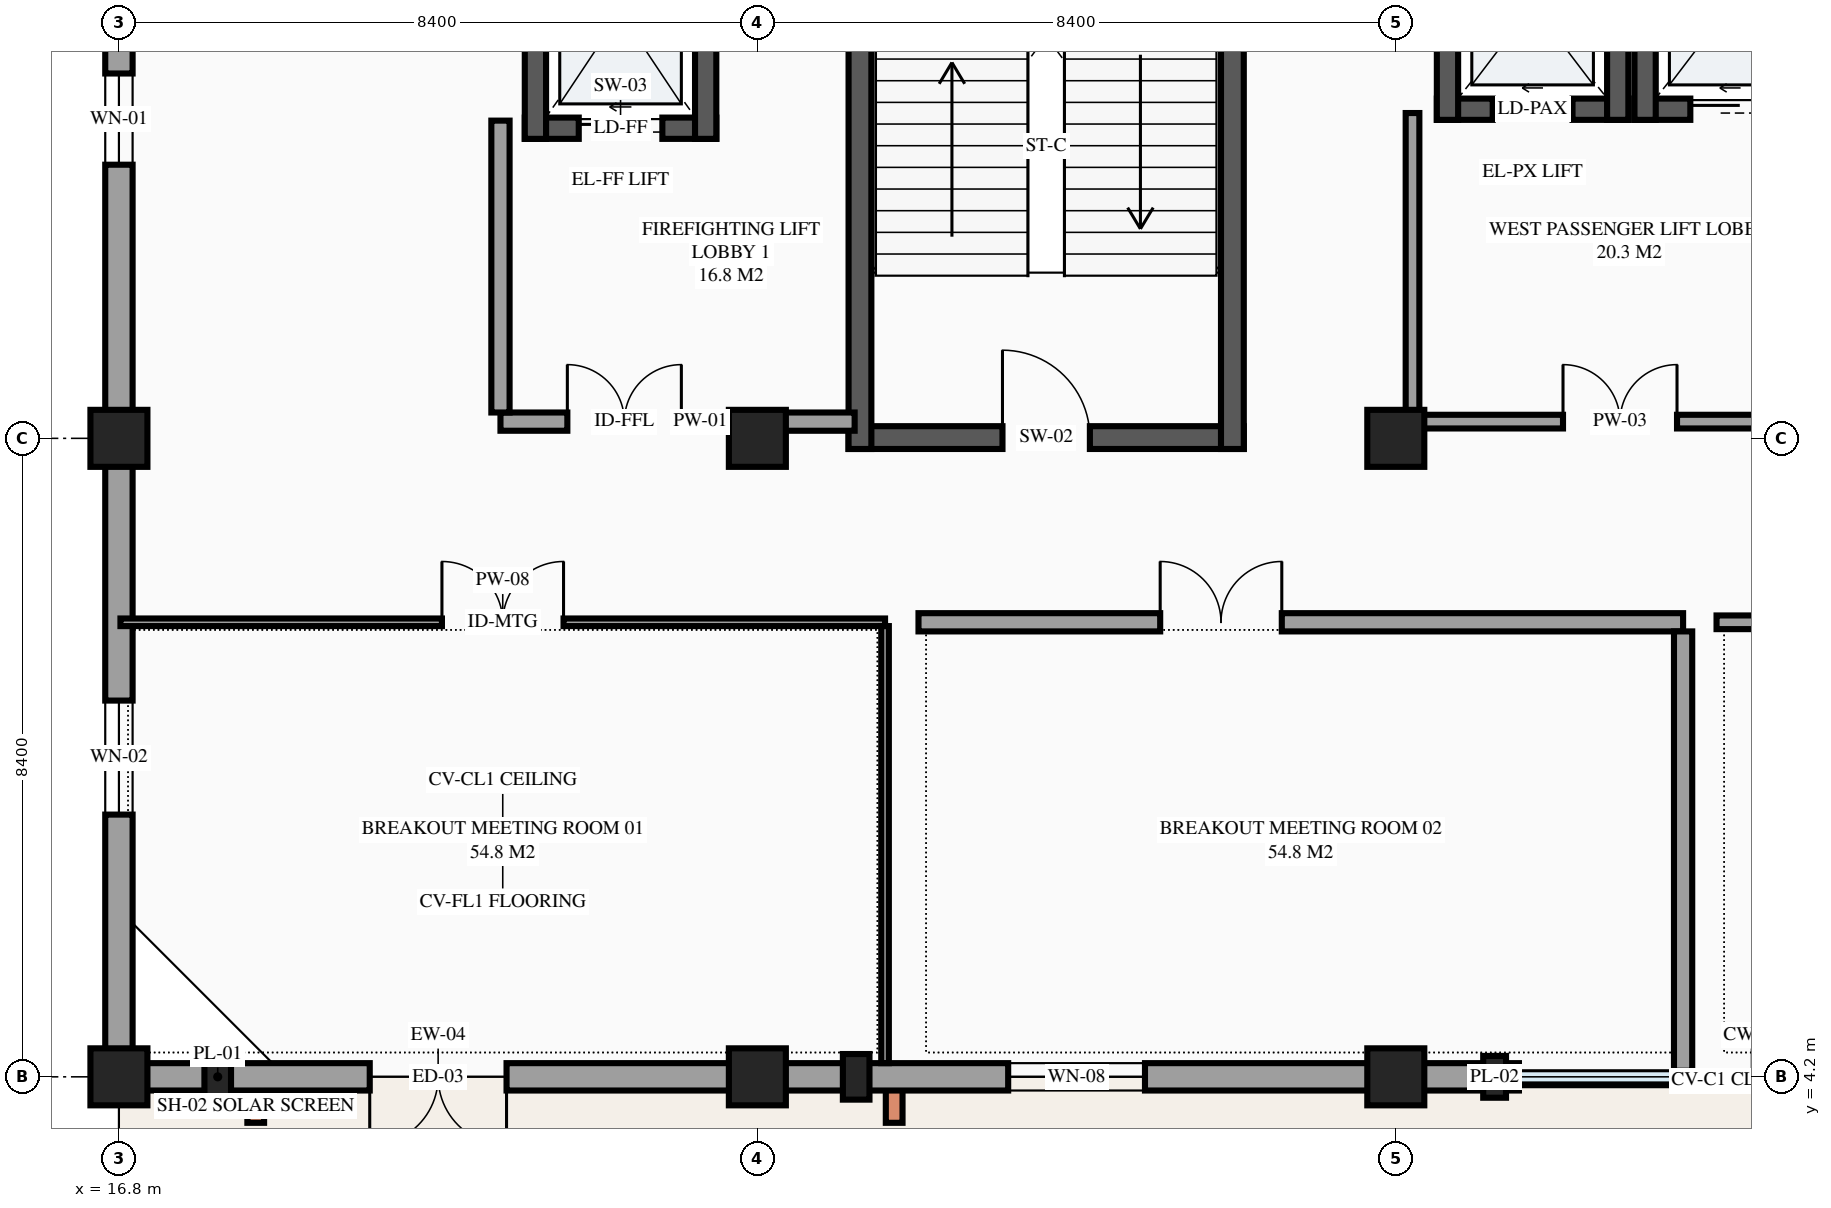
"""IFC4 building model, lengths in metres.
Left out: names, types, materials, properties, quantities, classifications, styles, units other than length and angle.
Written with IfcOpenShell. Run it as: python <this file> out.ifc"""

import sys

from ifc_helpers import new_model, si_unit, direction, frame, frame_2d, origin, origin_2d, place, context, subcontext, project, spatial, rectangle, extrude, element, fill, save


model = new_model("IFC4")
c1 = context("Model", 3, precision=1e-05, world=origin(), true_north=direction((0.0, 1.0)))
c2 = subcontext(c1, "Body", "Model", "MODEL_VIEW")
j1 = project(units=[si_unit("LENGTHUNIT", "METRE"), si_unit("PLANEANGLEUNIT", "RADIAN")], contexts=[c1])
p1 = place(None, origin())
s1 = spatial("IfcSite", under=j1, at=p1, CompositionType="ELEMENT")
p2 = place(p1, origin())
s2 = spatial("IfcBuilding", under=s1, at=p2, CompositionType="ELEMENT")
p3 = place(p2, frame((0.0, 0.0, 5.4)))
s3 = spatial("IfcBuildingStorey", under=s2, at=p3, CompositionType="ELEMENT", Elevation=5.4)
for number, where, z_axis, x_axis in (
    (1, (16.8, 4.2, 0.0), (0.0, 0.0, 1.0), (1.0, 0.0, 0.0)),
    (2, (16.8, 12.6, 0.0), (0.0, 0.0, 1.0), (1.0, 0.0, 0.0)),
    (3, (25.2, 4.2, 0.0), (0.0, 0.0, 1.0), (1.0, 0.0, 0.0)),
    (4, (25.2, 12.6, 0.0), (0.0, 0.0, 1.0), (1.0, 0.0, 0.0)),
    (5, (33.6, 4.2, 0.0), (0.0, 0.0, 1.0), (1.0, 0.0, 0.0)),
    (6, (33.6, 12.6, 0.0), (0.0, 0.0, 1.0), (1.0, 0.0, 0.0)),
):
    element("IfcColumn", number, at=place(p3, frame(where, z_axis=z_axis, x_axis=x_axis)), inside=s3, PredefinedType="COLUMN", context=c2, shape_type="SweptSolid", body=[
        extrude(rectangle(XDim=0.75, YDim=0.75, at=origin_2d()), origin(), (0.0, 0.0, 1.0), 4.5),
    ])
for number, where, z_axis, x_axis in (
    (7, (18.1, 4.2, 0.0), (0.0, 0.0, 1.0), (1.0, 0.0, 0.0)),
    (8, (26.5, 4.2, 0.0), (0.0, 0.0, 1.0), (1.0, 0.0, 0.0)),
):
    element("IfcColumn", number, at=place(p3, frame(where, z_axis=z_axis, x_axis=x_axis)), inside=s3, PredefinedType="PILASTER", context=c2, shape_type="SweptSolid", body=[
        extrude(rectangle(XDim=0.35, YDim=0.6, at=origin_2d()), origin(), (0.0, 0.0, 1.0), 4.5),
    ])
p4 = place(p3, frame((34.9, 4.2, 0.0), z_axis=(0.0, 0.0, 1.0), x_axis=(1.0, 0.0, 0.0)))
e9 = element("IfcColumn", 9, at=p4, inside=s3, PredefinedType="PILASTER", context=c2, shape_type="SweptSolid", body=[
    extrude(rectangle(XDim=0.3, YDim=0.55, at=origin_2d()), origin(), (0.0, 0.0, 1.0), 4.5),
])
p5 = place(p3, frame((16.8, 4.2, 0.0), z_axis=(0.0, 0.0, 1.0), x_axis=(1.0, 0.0, 0.0)))
e10 = element("IfcWall", 10, at=p5, inside=s3, PredefinedType="STANDARD", context=c2, shape_type="SweptSolid", body=[
    extrude(rectangle(XDim=8.4, YDim=0.36, at=frame_2d((4.2, 0.0))), origin(), (0.0, 0.0, 1.0), 4.5),
])
p6 = place(p5, frame((5.1, 0.0, 0.0), z_axis=(0.0, 0.0, 1.0), x_axis=(-1.0, 0.0, 0.0)))
e11 = element("IfcOpeningElement", 11, at=p6, cuts=e10, PredefinedType="OPENING", context=c2, shape_type="SweptSolid", body=[
    extrude(rectangle(XDim=1.8, YDim=2.3, at=frame_2d((0.9, 1.15))), frame((0.0, 0.19, 0.0), z_axis=(0.0, -1.0, 0.0), x_axis=(1.0, 0.0, 0.0)), (0.0, 0.0, 1.0), 0.38),
])
p7 = place(p3, frame((25.2, 4.2, 0.0), z_axis=(0.0, 0.0, 1.0), x_axis=(1.0, 0.0, 0.0)))
e12 = element("IfcWall", 12, at=p7, inside=s3, PredefinedType="STANDARD", context=c2, shape_type="SweptSolid", body=[
    extrude(rectangle(XDim=8.4, YDim=0.36, at=frame_2d((4.2, 0.0))), origin(), (0.0, 0.0, 1.0), 3.39),
])
p8 = place(p7, frame((3.3, 0.0, 0.75)))
e13 = element("IfcOpeningElement", 13, at=p8, cuts=e12, PredefinedType="OPENING", context=c2, shape_type="SweptSolid", body=[
    extrude(rectangle(XDim=1.8, YDim=1.5, at=frame_2d((0.9, 0.75))), frame((0.0, 0.19, 0.0), z_axis=(0.0, -1.0, 0.0), x_axis=(1.0, 0.0, 0.0)), (0.0, 0.0, 1.0), 0.38),
])
p9 = place(p3, frame((33.6, 4.2, 0.0), z_axis=(0.0, 0.0, 1.0), x_axis=(1.0, 0.0, 0.0)))
e14 = element("IfcWall", 14, at=p9, inside=s3, PredefinedType="STANDARD", context=c2, shape_type="SweptSolid", body=[
    extrude(rectangle(XDim=1.62, YDim=0.36, at=frame_2d((0.81, 0.0))), origin(), (0.0, 0.0, 1.0), 3.74),
])
p10 = place(p3, frame((16.8, 21.0, 0.0), z_axis=(0.0, 0.0, 1.0), x_axis=(0.0, -1.0, 0.0)))
e15 = element("IfcWall", 15, at=p10, inside=s3, PredefinedType="STANDARD", context=c2, shape_type="SweptSolid", body=[
    extrude(rectangle(XDim=8.4, YDim=0.36, at=frame_2d((4.2, 0.0))), origin(), (0.0, 0.0, 1.0), 3.54),
])
p11 = place(p10, frame((3.6, 0.0, 0.8)))
e16 = element("IfcOpeningElement", 16, at=p11, cuts=e15, PredefinedType="OPENING", context=c2, shape_type="SweptSolid", body=[
    extrude(rectangle(XDim=1.2, YDim=1.5, at=frame_2d((0.6, 0.75))), frame((0.0, 0.19, 0.0), z_axis=(0.0, -1.0, 0.0), x_axis=(1.0, 0.0, 0.0)), (0.0, 0.0, 1.0), 0.38),
])
p12 = place(p3, frame((16.8, 12.6, 0.0), z_axis=(0.0, 0.0, 1.0), x_axis=(0.0, -1.0, 0.0)))
e17 = element("IfcWall", 17, at=p12, inside=s3, PredefinedType="STANDARD", context=c2, shape_type="SweptSolid", body=[
    extrude(rectangle(XDim=8.4, YDim=0.36, at=frame_2d((4.2, 0.0))), origin(), (0.0, 0.0, 1.0), 3.59),
])
p13 = place(p12, frame((3.45, 0.0, 0.8)))
e18 = element("IfcOpeningElement", 18, at=p13, cuts=e17, PredefinedType="OPENING", context=c2, shape_type="SweptSolid", body=[
    extrude(rectangle(XDim=1.5, YDim=1.5, at=frame_2d((0.75, 0.75))), frame((0.0, 0.19, 0.0), z_axis=(0.0, -1.0, 0.0), x_axis=(1.0, 0.0, 0.0)), (0.0, 0.0, 1.0), 0.38),
])
p14 = place(p3, frame((22.14, 16.68, 0.0), z_axis=(0.0, 0.0, 1.0), x_axis=(1.0, 0.0, 0.0)))
e19 = element("IfcWall", 19, at=p14, inside=s3, PredefinedType="SHEAR", context=c2, shape_type="SweptSolid", body=[
    extrude(rectangle(XDim=2.52, YDim=0.28, at=frame_2d((1.26, 0.0))), origin(), (0.0, 0.0, 1.0), 4.5),
])
p15 = place(p14, frame((0.71, 0.0, 0.0)))
e20 = element("IfcOpeningElement", 20, at=p15, cuts=e19, PredefinedType="OPENING", context=c2, shape_type="SweptSolid", body=[
    extrude(rectangle(XDim=1.1, YDim=2.2, at=frame_2d((0.55, 1.1))), frame((0.0, 0.15, 0.0), z_axis=(0.0, -1.0, 0.0), x_axis=(1.0, 0.0, 0.0)), (0.0, 0.0, 1.0), 0.3),
])
for number, where, z_axis, x_axis in (
    (21, (24.52, 16.54, 0.0), (0.0, 0.0, 1.0), (0.0, 1.0, 0.0)),
    (22, (22.28, 19.86, 0.0), (0.0, 0.0, 1.0), (0.0, -1.0, 0.0)),
):
    element("IfcWall", number, at=place(p3, frame(where, z_axis=z_axis, x_axis=x_axis)), inside=s3, PredefinedType="SHEAR", context=c2, shape_type="SweptSolid", body=[
        extrude(rectangle(XDim=3.32, YDim=0.28, at=frame_2d((1.66, 0.0))), origin(), (0.0, 0.0, 1.0), 4.5),
    ])
p16 = place(p3, frame((34.14, 16.93, 0.0), z_axis=(0.0, 0.0, 1.0), x_axis=(1.0, 0.0, 0.0)))
e23 = element("IfcWall", 23, at=p16, inside=s3, PredefinedType="SHEAR", context=c2, shape_type="SweptSolid", body=[
    extrude(rectangle(XDim=2.52, YDim=0.28, at=frame_2d((1.26, 0.0))), origin(), (0.0, 0.0, 1.0), 4.5),
])
p17 = place(p16, frame((0.735, 0.0, 0.0)))
e24 = element("IfcOpeningElement", 24, at=p17, cuts=e23, PredefinedType="OPENING", context=c2, shape_type="SweptSolid", body=[
    extrude(rectangle(XDim=1.05, YDim=2.2, at=frame_2d((0.525, 1.1))), frame((0.0, 0.15, 0.0), z_axis=(0.0, -1.0, 0.0), x_axis=(1.0, 0.0, 0.0)), (0.0, 0.0, 1.0), 0.3),
])
for number, where, z_axis, x_axis in (
    (25, (36.52, 16.79, 0.0), (0.0, 0.0, 1.0), (0.0, 1.0, 0.0)),
    (26, (34.28, 19.81, 0.0), (0.0, 0.0, 1.0), (0.0, -1.0, 0.0)),
):
    element("IfcWall", number, at=place(p3, frame(where, z_axis=z_axis, x_axis=x_axis)), inside=s3, PredefinedType="SHEAR", context=c2, shape_type="SweptSolid", body=[
        extrude(rectangle(XDim=3.02, YDim=0.28, at=frame_2d((1.51, 0.0))), origin(), (0.0, 0.0, 1.0), 4.5),
    ])
p18 = place(p3, frame((36.74, 16.93, 0.0), z_axis=(0.0, 0.0, 1.0), x_axis=(1.0, 0.0, 0.0)))
e27 = element("IfcWall", 27, at=p18, inside=s3, PredefinedType="SHEAR", context=c2, shape_type="SweptSolid", body=[
    extrude(rectangle(XDim=2.52, YDim=0.28, at=frame_2d((1.26, 0.0))), origin(), (0.0, 0.0, 1.0), 4.5),
])
p19 = place(p18, frame((0.735, 0.0, 0.0)))
e28 = element("IfcOpeningElement", 28, at=p19, cuts=e27, PredefinedType="OPENING", context=c2, shape_type="SweptSolid", body=[
    extrude(rectangle(XDim=1.05, YDim=2.2, at=frame_2d((0.525, 1.1))), frame((0.0, 0.15, 0.0), z_axis=(0.0, -1.0, 0.0), x_axis=(1.0, 0.0, 0.0)), (0.0, 0.0, 1.0), 0.3),
])
p20 = place(p3, frame((36.88, 19.81, 0.0), z_axis=(0.0, 0.0, 1.0), x_axis=(0.0, -1.0, 0.0)))
e29 = element("IfcWall", 29, at=p20, inside=s3, PredefinedType="SHEAR", context=c2, shape_type="SweptSolid", body=[
    extrude(rectangle(XDim=3.02, YDim=0.28, at=frame_2d((1.51, 0.0))), origin(), (0.0, 0.0, 1.0), 4.5),
])
p21 = place(p3, frame((26.4, 12.61, 0.0), z_axis=(0.0, 0.0, 1.0), x_axis=(1.0, 0.0, 0.0)))
e30 = element("IfcWall", 30, at=p21, inside=s3, PredefinedType="SHEAR", context=c2, shape_type="SweptSolid", body=[
    extrude(rectangle(XDim=5.2, YDim=0.3, at=frame_2d((2.6, 0.0))), origin(), (0.0, 0.0, 1.0), 4.5),
])
p22 = place(p21, frame((2.025, 0.0, 0.0)))
e31 = element("IfcOpeningElement", 31, at=p22, cuts=e30, PredefinedType="OPENING", context=c2, shape_type="SweptSolid", body=[
    extrude(rectangle(XDim=1.15, YDim=2.15, at=frame_2d((0.575, 1.075))), frame((0.0, 0.16, 0.0), z_axis=(0.0, -1.0, 0.0), x_axis=(1.0, 0.0, 0.0)), (0.0, 0.0, 1.0), 0.32),
])
for number, where, z_axis, x_axis in (
    (32, (31.45, 12.46, 0.0), (0.0, 0.0, 1.0), (0.0, 1.0, 0.0)),
    (33, (26.55, 21.3, 0.0), (0.0, 0.0, 1.0), (0.0, -1.0, 0.0)),
):
    element("IfcWall", number, at=place(p3, frame(where, z_axis=z_axis, x_axis=x_axis)), inside=s3, PredefinedType="SHEAR", context=c2, shape_type="SweptSolid", body=[
        extrude(rectangle(XDim=8.84, YDim=0.3, at=frame_2d((4.42, 0.0))), origin(), (0.0, 0.0, 1.0), 4.5),
    ])
p23 = place(p3, frame((21.82, 12.82, 0.0), z_axis=(0.0, 0.0, 1.0), x_axis=(1.0, 0.0, 0.0)))
e34 = element("IfcWall", 34, at=p23, inside=s3, PredefinedType="PARTITIONING", context=c2, shape_type="SweptSolid", body=[
    extrude(rectangle(XDim=4.66, YDim=0.24, at=frame_2d((2.33, 0.0))), origin(), (0.0, 0.0, 1.0), 3.34),
])
p24 = place(p23, frame((0.88, 0.0, 0.0)))
e35 = element("IfcOpeningElement", 35, at=p24, cuts=e34, PredefinedType="OPENING", context=c2, shape_type="SweptSolid", body=[
    extrude(rectangle(XDim=1.5, YDim=2.15, at=frame_2d((0.75, 1.075))), frame((0.0, 0.13, 0.0), z_axis=(0.0, -1.0, 0.0), x_axis=(1.0, 0.0, 0.0)), (0.0, 0.0, 1.0), 0.26),
])
p25 = place(p3, frame((21.82, 12.94, 0.0), z_axis=(0.0, 0.0, 1.0), x_axis=(0.0, 1.0, 0.0)))
e36 = element("IfcWall", 36, at=p25, inside=s3, PredefinedType="PARTITIONING", context=c2, shape_type="SweptSolid", body=[
    extrude(rectangle(XDim=3.84, YDim=0.24, at=frame_2d((1.92, 0.0))), origin(), (0.0, 0.0, 1.0), 4.235),
])
p26 = place(p3, frame((33.82, 12.82, 0.0), z_axis=(0.0, 0.0, 1.0), x_axis=(1.0, 0.0, 0.0)))
e37 = element("IfcWall", 37, at=p26, inside=s3, PredefinedType="PARTITIONING", context=c2, shape_type="SweptSolid", body=[
    extrude(rectangle(XDim=5.46, YDim=0.18, at=frame_2d((2.73, 0.0))), origin(), (0.0, 0.0, 1.0), 4.235),
])
p27 = place(p26, frame((1.98, 0.0, 0.0)))
e38 = element("IfcOpeningElement", 38, at=p27, cuts=e37, PredefinedType="OPENING", context=c2, shape_type="SweptSolid", body=[
    extrude(rectangle(XDim=1.5, YDim=2.15, at=frame_2d((0.75, 1.075))), frame((0.0, 0.1, 0.0), z_axis=(0.0, -1.0, 0.0), x_axis=(1.0, 0.0, 0.0)), (0.0, 0.0, 1.0), 0.2),
])
p28 = place(p3, frame((33.82, 12.91, 0.0), z_axis=(0.0, 0.0, 1.0), x_axis=(0.0, 1.0, 0.0)))
e39 = element("IfcWall", 39, at=p28, inside=s3, PredefinedType="PARTITIONING", context=c2, shape_type="SweptSolid", body=[
    extrude(rectangle(XDim=3.97, YDim=0.18, at=frame_2d((1.985, 0.0))), origin(), (0.0, 0.0, 1.0), 3.29),
])
p29 = place(p3, frame((16.82, 10.18, 0.0), z_axis=(0.0, 0.0, 1.0), x_axis=(1.0, 0.0, 0.0)))
e40 = element("IfcWall", 40, at=p29, inside=s3, PredefinedType="PARTITIONING", context=c2, shape_type="SweptSolid", body=[
    extrude(rectangle(XDim=10.06, YDim=0.1, at=frame_2d((5.03, 0.0))), origin(), (0.0, 0.0, 1.0), 4.235),
])
p30 = place(p29, frame((4.23, 0.0, 0.0)))
e41 = element("IfcOpeningElement", 41, at=p30, cuts=e40, PredefinedType="OPENING", context=c2, shape_type="SweptSolid", body=[
    extrude(rectangle(XDim=1.6, YDim=2.25, at=frame_2d((0.8, 1.125))), frame((0.0, 0.06, 0.0), z_axis=(0.0, -1.0, 0.0), x_axis=(1.0, 0.0, 0.0)), (0.0, 0.0, 1.0), 0.12),
])
p31 = place(p3, frame((26.88, 4.38, 0.0), z_axis=(0.0, 0.0, 1.0), x_axis=(0.0, 1.0, 0.0)))
e42 = element("IfcWall", 42, at=p31, inside=s3, PredefinedType="PARTITIONING", context=c2, shape_type="SweptSolid", body=[
    extrude(rectangle(XDim=5.75, YDim=0.1, at=frame_2d((2.875, 0.0))), origin(), (0.0, 0.0, 1.0), 4.235),
])
p32 = place(p3, frame((27.32, 10.18, 0.0), z_axis=(0.0, 0.0, 1.0), x_axis=(1.0, 0.0, 0.0)))
e43 = element("IfcWall", 43, at=p32, inside=s3, PredefinedType="PARTITIONING", context=c2, shape_type="SweptSolid", body=[
    extrude(rectangle(XDim=10.06, YDim=0.24, at=frame_2d((5.03, 0.0))), origin(), (0.0, 0.0, 1.0), 4.235),
])
p33 = place(p32, frame((3.18, 0.0, 0.0)))
e44 = element("IfcOpeningElement", 44, at=p33, cuts=e43, PredefinedType="OPENING", context=c2, shape_type="SweptSolid", body=[
    extrude(rectangle(XDim=1.6, YDim=2.25, at=frame_2d((0.8, 1.125))), frame((0.0, 0.13, 0.0), z_axis=(0.0, -1.0, 0.0), x_axis=(1.0, 0.0, 0.0)), (0.0, 0.0, 1.0), 0.26),
])
p34 = place(p3, frame((37.38, 4.28, 0.0), z_axis=(0.0, 0.0, 1.0), x_axis=(0.0, 1.0, 0.0)))
e45 = element("IfcWall", 45, at=p34, inside=s3, PredefinedType="PARTITIONING", context=c2, shape_type="SweptSolid", body=[
    extrude(rectangle(XDim=5.78, YDim=0.24, at=frame_2d((2.89, 0.0))), origin(), (0.0, 0.0, 1.0), 4.235),
])
p35 = place(p3, frame((37.82, 10.18, 0.0), z_axis=(0.0, 0.0, 1.0), x_axis=(1.0, 0.0, 0.0)))
e46 = element("IfcWall", 46, at=p35, inside=s3, PredefinedType="PARTITIONING", context=c2, shape_type="SweptSolid", body=[
    extrude(rectangle(XDim=10.06, YDim=0.18, at=frame_2d((5.03, 0.0))), origin(), (0.0, 0.0, 1.0), 4.235),
])
p36 = place(p35, frame((5.63, 0.0, 0.0)))
e47 = element("IfcOpeningElement", 47, at=p36, cuts=e46, PredefinedType="OPENING", context=c2, shape_type="SweptSolid", body=[
    extrude(rectangle(XDim=1.6, YDim=2.25, at=frame_2d((0.8, 1.125))), frame((0.0, 0.1, 0.0), z_axis=(0.0, -1.0, 0.0), x_axis=(1.0, 0.0, 0.0)), (0.0, 0.0, 1.0), 0.2),
])
p37 = place(p8, origin())
e48 = element("IfcWindow", 48, at=p37, inside=s3, PartitioningType="SINGLE_PANEL", PredefinedType="WINDOW", context=c2, shape_type="SweptSolid", body=[
    extrude(rectangle(XDim=1.8, YDim=1.5, at=frame_2d((0.9, 0.75))), frame((0.0, 0.03, 0.0), z_axis=(0.0, -1.0, 0.0), x_axis=(1.0, 0.0, 0.0)), (0.0, 0.0, 1.0), 0.06),
])
fill(e13, e48)
p38 = place(p6, origin())
e49 = element("IfcDoor", 49, at=p38, inside=s3, OperationType="DOUBLE_DOOR_SINGLE_SWING", PredefinedType="DOOR", context=c2, shape_type="SweptSolid", body=[
    extrude(rectangle(XDim=1.8, YDim=2.3, at=frame_2d((0.9, 1.15))), frame((0.0, 0.025, 0.0), z_axis=(0.0, -1.0, 0.0), x_axis=(1.0, 0.0, 0.0)), (0.0, 0.0, 1.0), 0.05),
])
fill(e11, e49)
p39 = place(p11, origin())
e50 = element("IfcWindow", 50, at=p39, inside=s3, PartitioningType="SINGLE_PANEL", PredefinedType="WINDOW", context=c2, shape_type="SweptSolid", body=[
    extrude(rectangle(XDim=1.2, YDim=1.5, at=frame_2d((0.6, 0.75))), frame((0.0, 0.03, 0.0), z_axis=(0.0, -1.0, 0.0), x_axis=(1.0, 0.0, 0.0)), (0.0, 0.0, 1.0), 0.06),
])
fill(e16, e50)
p40 = place(p13, origin())
e51 = element("IfcWindow", 51, at=p40, inside=s3, PartitioningType="SINGLE_PANEL", PredefinedType="WINDOW", context=c2, shape_type="SweptSolid", body=[
    extrude(rectangle(XDim=1.5, YDim=1.5, at=frame_2d((0.75, 0.75))), frame((0.0, 0.03, 0.0), z_axis=(0.0, -1.0, 0.0), x_axis=(1.0, 0.0, 0.0)), (0.0, 0.0, 1.0), 0.06),
])
fill(e18, e51)
p41 = place(p15, origin())
e52 = element("IfcDoor", 52, at=p41, inside=s3, OperationType="SLIDING_TO_LEFT", PredefinedType="DOOR", context=c2, shape_type="SweptSolid", body=[
    extrude(rectangle(XDim=1.1, YDim=2.2, at=frame_2d((0.55, 1.1))), frame((0.0, 0.025, 0.0), z_axis=(0.0, -1.0, 0.0), x_axis=(1.0, 0.0, 0.0)), (0.0, 0.0, 1.0), 0.05),
])
fill(e20, e52)
p42 = place(p17, origin())
e53 = element("IfcDoor", 53, at=p42, inside=s3, OperationType="SLIDING_TO_LEFT", PredefinedType="DOOR", context=c2, shape_type="SweptSolid", body=[
    extrude(rectangle(XDim=1.05, YDim=2.2, at=frame_2d((0.525, 1.1))), frame((0.0, 0.025, 0.0), z_axis=(0.0, -1.0, 0.0), x_axis=(1.0, 0.0, 0.0)), (0.0, 0.0, 1.0), 0.05),
])
fill(e24, e53)
p43 = place(p19, origin())
e54 = element("IfcDoor", 54, at=p43, inside=s3, OperationType="SLIDING_TO_LEFT", PredefinedType="DOOR", context=c2, shape_type="SweptSolid", body=[
    extrude(rectangle(XDim=1.05, YDim=2.2, at=frame_2d((0.525, 1.1))), frame((0.0, 0.025, 0.0), z_axis=(0.0, -1.0, 0.0), x_axis=(1.0, 0.0, 0.0)), (0.0, 0.0, 1.0), 0.05),
])
fill(e28, e54)
p44 = place(p22, origin())
e55 = element("IfcDoor", 55, at=p44, inside=s3, OperationType="SINGLE_SWING_LEFT", PredefinedType="DOOR", context=c2, shape_type="SweptSolid", body=[
    extrude(rectangle(XDim=1.15, YDim=2.15, at=frame_2d((0.575, 1.075))), frame((0.0, 0.025, 0.0), z_axis=(0.0, -1.0, 0.0), x_axis=(1.0, 0.0, 0.0)), (0.0, 0.0, 1.0), 0.05),
])
fill(e31, e55)
p45 = place(p24, origin())
e56 = element("IfcDoor", 56, at=p45, inside=s3, OperationType="DOUBLE_DOOR_SINGLE_SWING", PredefinedType="DOOR", context=c2, shape_type="SweptSolid", body=[
    extrude(rectangle(XDim=1.5, YDim=2.15, at=frame_2d((0.75, 1.075))), frame((0.0, 0.025, 0.0), z_axis=(0.0, -1.0, 0.0), x_axis=(1.0, 0.0, 0.0)), (0.0, 0.0, 1.0), 0.05),
])
fill(e35, e56)
p46 = place(p27, origin())
e57 = element("IfcDoor", 57, at=p46, inside=s3, OperationType="DOUBLE_DOOR_SINGLE_SWING", PredefinedType="DOOR", context=c2, shape_type="SweptSolid", body=[
    extrude(rectangle(XDim=1.5, YDim=2.15, at=frame_2d((0.75, 1.075))), frame((0.0, 0.025, 0.0), z_axis=(0.0, -1.0, 0.0), x_axis=(1.0, 0.0, 0.0)), (0.0, 0.0, 1.0), 0.05),
])
fill(e38, e57)
p47 = place(p30, origin())
e58 = element("IfcDoor", 58, at=p47, inside=s3, OperationType="DOUBLE_DOOR_SINGLE_SWING", PredefinedType="DOOR", context=c2, shape_type="SweptSolid", body=[
    extrude(rectangle(XDim=1.6, YDim=2.25, at=frame_2d((0.8, 1.125))), frame((0.0, 0.025, 0.0), z_axis=(0.0, -1.0, 0.0), x_axis=(1.0, 0.0, 0.0)), (0.0, 0.0, 1.0), 0.05),
])
fill(e41, e58)
p48 = place(p33, origin())
e59 = element("IfcDoor", 59, at=p48, inside=s3, OperationType="DOUBLE_DOOR_SINGLE_SWING", PredefinedType="DOOR", context=c2, shape_type="SweptSolid", body=[
    extrude(rectangle(XDim=1.6, YDim=2.25, at=frame_2d((0.8, 1.125))), frame((0.0, 0.025, 0.0), z_axis=(0.0, -1.0, 0.0), x_axis=(1.0, 0.0, 0.0)), (0.0, 0.0, 1.0), 0.05),
])
fill(e44, e59)
save(model, sys.argv[1])
